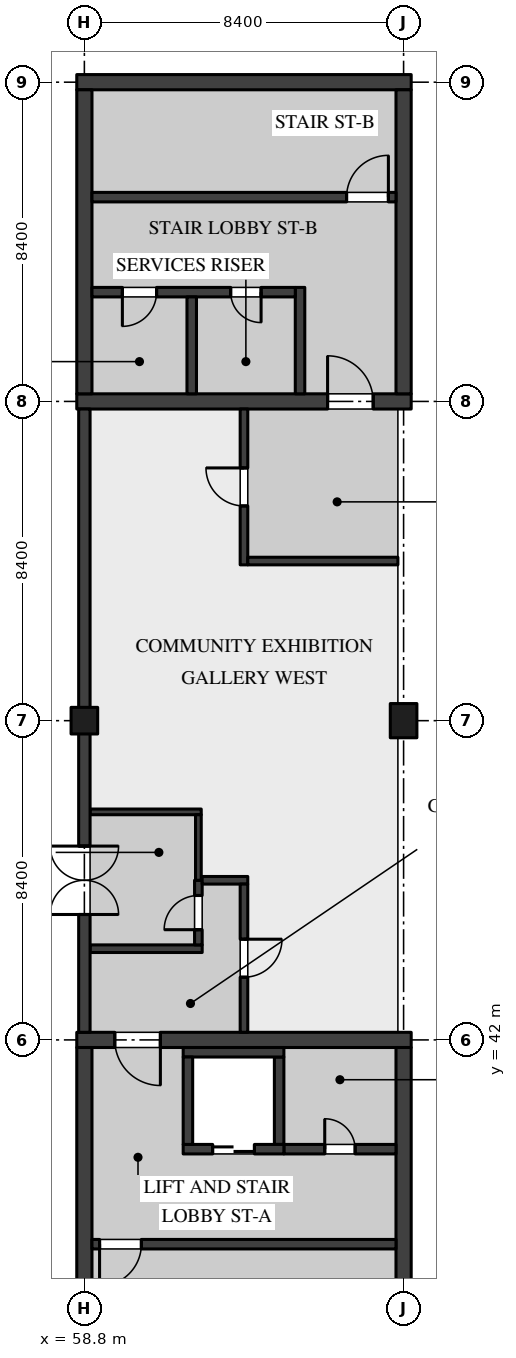
"""IFC4 building model, lengths in metres.
Left out: names, types, materials, properties, quantities, classifications, styles, units other than length and angle.
Written with IfcOpenShell. Run it as: python <this file> out.ifc"""

import sys

from ifc_helpers import new_model, si_unit, direction, frame, frame_2d, origin, origin_2d, place, context, subcontext, project, spatial, rectangle, extrude, element, fill, save


model = new_model("IFC4")
c1 = context("Model", 3, precision=1e-05, world=origin(), true_north=direction((0.0, 1.0)))
c2 = subcontext(c1, "Body", "Model", "MODEL_VIEW")
j1 = project(units=[si_unit("LENGTHUNIT", "METRE"), si_unit("PLANEANGLEUNIT", "RADIAN")], contexts=[c1])
p1 = place(None, origin())
s1 = spatial("IfcSite", under=j1, at=p1, CompositionType="ELEMENT")
p2 = place(p1, origin())
s2 = spatial("IfcBuilding", under=s1, at=p2, CompositionType="ELEMENT")
p3 = place(p2, frame((0.0, 0.0, 5.4)))
s3 = spatial("IfcBuildingStorey", under=s2, at=p3, CompositionType="ELEMENT", Elevation=5.4)
p4 = place(p3, frame((58.8, 50.4, 0.0), z_axis=(0.0, 0.0, 1.0), x_axis=(1.0, 0.0, 0.0)))
e1 = element("IfcColumn", 1, at=p4, inside=s3, PredefinedType="COLUMN", context=c2, shape_type="SweptSolid", body=[
    extrude(rectangle(XDim=0.7, YDim=0.7, at=origin_2d()), origin(), (0.0, 0.0, 1.0), 4.5),
])
p5 = place(p3, frame((67.2, 50.4, 0.0), z_axis=(0.0, 0.0, 1.0), x_axis=(1.0, 0.0, 0.0)))
e2 = element("IfcColumn", 2, at=p5, inside=s3, PredefinedType="COLUMN", context=c2, shape_type="SweptSolid", body=[
    extrude(rectangle(XDim=0.7, YDim=0.9, at=origin_2d()), origin(), (0.0, 0.0, 1.0), 4.5),
])
p6 = place(p3, frame((58.6, 42.0, 0.0), z_axis=(0.0, 0.0, 1.0), x_axis=(1.0, 0.0, 0.0)))
e3 = element("IfcWall", 3, at=p6, inside=s3, PredefinedType="SHEAR", context=c2, shape_type="SweptSolid", body=[
    extrude(rectangle(XDim=8.8, YDim=0.4, at=frame_2d((4.4, 0.0))), origin(), (0.0, 0.0, 1.0), 4.25),
])
p7 = place(p6, frame((1.0, 0.0, 0.0)))
e4 = element("IfcOpeningElement", 4, at=p7, cuts=e3, PredefinedType="OPENING", context=c2, shape_type="SweptSolid", body=[
    extrude(rectangle(XDim=1.2, YDim=2.1, at=frame_2d((0.6, 1.05))), frame((0.0, 0.21, 0.0), z_axis=(0.0, -1.0, 0.0), x_axis=(1.0, 0.0, 0.0)), (0.0, 0.0, 1.0), 0.42),
])
for number, where, z_axis, x_axis in (
    (5, (58.8, 33.8, 0.0), (0.0, 0.0, 1.0), (0.0, 1.0, 0.0)),
    (6, (67.2, 33.8, 0.0), (0.0, 0.0, 1.0), (0.0, 1.0, 0.0)),
):
    element("IfcWall", number, at=place(p3, frame(where, z_axis=z_axis, x_axis=x_axis)), inside=s3, PredefinedType="SHEAR", context=c2, shape_type="SweptSolid", body=[
        extrude(rectangle(XDim=8.0, YDim=0.4, at=frame_2d((4.0, 0.0))), origin(), (0.0, 0.0, 1.0), 4.25),
    ])
p8 = place(p3, frame((59.0, 36.625, 0.0), z_axis=(0.0, 0.0, 1.0), x_axis=(1.0, 0.0, 0.0)))
e7 = element("IfcWall", 7, at=p8, inside=s3, PredefinedType="SOLIDWALL", context=c2, shape_type="SweptSolid", body=[
    extrude(rectangle(XDim=8.0, YDim=0.25, at=frame_2d((4.0, 0.0))), origin(), (0.0, 0.0, 1.0), 4.25),
])
p9 = place(p8, frame((0.2, 0.0, 0.0)))
e8 = element("IfcOpeningElement", 8, at=p9, cuts=e7, PredefinedType="OPENING", context=c2, shape_type="SweptSolid", body=[
    extrude(rectangle(XDim=1.1, YDim=2.1, at=frame_2d((0.55, 1.05))), frame((0.0, 0.135, 0.0), z_axis=(0.0, -1.0, 0.0), x_axis=(1.0, 0.0, 0.0)), (0.0, 0.0, 1.0), 0.27),
])
p10 = place(p3, frame((64.05, 39.125, 0.0), z_axis=(0.0, 0.0, 1.0), x_axis=(1.0, 0.0, 0.0)))
e9 = element("IfcWall", 9, at=p10, inside=s3, PredefinedType="SOLIDWALL", context=c2, shape_type="SweptSolid", body=[
    extrude(rectangle(XDim=2.95, YDim=0.25, at=frame_2d((1.475, 0.0))), origin(), (0.0, 0.0, 1.0), 4.25),
])
p11 = place(p10, frame((1.075, 0.0, 0.0)))
e10 = element("IfcOpeningElement", 10, at=p11, cuts=e9, PredefinedType="OPENING", context=c2, shape_type="SweptSolid", body=[
    extrude(rectangle(XDim=0.8, YDim=2.1, at=frame_2d((0.4, 1.05))), frame((0.0, 0.135, 0.0), z_axis=(0.0, -1.0, 0.0), x_axis=(1.0, 0.0, 0.0)), (0.0, 0.0, 1.0), 0.27),
])
p12 = place(p3, frame((58.6, 58.8, 0.0), z_axis=(0.0, 0.0, 1.0), x_axis=(1.0, 0.0, 0.0)))
e11 = element("IfcWall", 11, at=p12, inside=s3, PredefinedType="SHEAR", context=c2, shape_type="SweptSolid", body=[
    extrude(rectangle(XDim=8.8, YDim=0.4, at=frame_2d((4.4, 0.0))), origin(), (0.0, 0.0, 1.0), 4.25),
])
p13 = place(p12, frame((6.6, 0.0, 0.0)))
e12 = element("IfcOpeningElement", 12, at=p13, cuts=e11, PredefinedType="OPENING", context=c2, shape_type="SweptSolid", body=[
    extrude(rectangle(XDim=1.2, YDim=2.1, at=frame_2d((0.6, 1.05))), frame((0.0, 0.21, 0.0), z_axis=(0.0, -1.0, 0.0), x_axis=(1.0, 0.0, 0.0)), (0.0, 0.0, 1.0), 0.42),
])
p14 = place(p3, frame((58.6, 67.2, 0.0), z_axis=(0.0, 0.0, 1.0), x_axis=(1.0, 0.0, 0.0)))
e13 = element("IfcWall", 13, at=p14, inside=s3, PredefinedType="SHEAR", context=c2, shape_type="SweptSolid", body=[
    extrude(rectangle(XDim=8.8, YDim=0.4, at=frame_2d((4.4, 0.0))), origin(), (0.0, 0.0, 1.0), 4.25),
])
for number, where, z_axis, x_axis in (
    (14, (58.8, 59.0, 0.0), (0.0, 0.0, 1.0), (0.0, 1.0, 0.0)),
    (15, (67.2, 59.0, 0.0), (0.0, 0.0, 1.0), (0.0, 1.0, 0.0)),
):
    element("IfcWall", number, at=place(p3, frame(where, z_axis=z_axis, x_axis=x_axis)), inside=s3, PredefinedType="SHEAR", context=c2, shape_type="SweptSolid", body=[
        extrude(rectangle(XDim=8.0, YDim=0.4, at=frame_2d((4.0, 0.0))), origin(), (0.0, 0.0, 1.0), 4.25),
    ])
p15 = place(p3, frame((67.0, 64.175, 0.0), z_axis=(0.0, 0.0, 1.0), x_axis=(-1.0, 0.0, 0.0)))
e16 = element("IfcWall", 16, at=p15, inside=s3, PredefinedType="SOLIDWALL", context=c2, shape_type="SweptSolid", body=[
    extrude(rectangle(XDim=8.0, YDim=0.25, at=frame_2d((4.0, 0.0))), origin(), (0.0, 0.0, 1.0), 4.25),
])
p16 = place(p15, frame((0.2, 0.0, 0.0)))
e17 = element("IfcOpeningElement", 17, at=p16, cuts=e16, PredefinedType="OPENING", context=c2, shape_type="SweptSolid", body=[
    extrude(rectangle(XDim=1.1, YDim=2.1, at=frame_2d((0.55, 1.05))), frame((0.0, 0.135, 0.0), z_axis=(0.0, -1.0, 0.0), x_axis=(1.0, 0.0, 0.0)), (0.0, 0.0, 1.0), 0.27),
])
p17 = place(p3, frame((64.475, 61.8, 0.0), z_axis=(0.0, 0.0, 1.0), x_axis=(0.0, -1.0, 0.0)))
e18 = element("IfcWall", 18, at=p17, inside=s3, PredefinedType="SOLIDWALL", context=c2, shape_type="SweptSolid", body=[
    extrude(rectangle(XDim=2.8, YDim=0.25, at=frame_2d((1.4, 0.0))), origin(), (0.0, 0.0, 1.0), 4.25),
])
p18 = place(p3, frame((64.35, 61.675, 0.0), z_axis=(0.0, 0.0, 1.0), x_axis=(-1.0, 0.0, 0.0)))
e19 = element("IfcWall", 19, at=p18, inside=s3, PredefinedType="SOLIDWALL", context=c2, shape_type="SweptSolid", body=[
    extrude(rectangle(XDim=5.35, YDim=0.25, at=frame_2d((2.675, 0.0))), origin(), (0.0, 0.0, 1.0), 4.25),
])
p19 = place(p18, frame((3.65, 0.0, 0.0)))
e20 = element("IfcOpeningElement", 20, at=p19, cuts=e19, PredefinedType="OPENING", context=c2, shape_type="SweptSolid", body=[
    extrude(rectangle(XDim=0.9, YDim=2.1, at=frame_2d((0.45, 1.05))), frame((0.0, 0.135, 0.0), z_axis=(0.0, -1.0, 0.0), x_axis=(1.0, 0.0, 0.0)), (0.0, 0.0, 1.0), 0.27),
])
p20 = place(p18, frame((0.9, 0.0, 0.0)))
e21 = element("IfcOpeningElement", 21, at=p20, cuts=e19, PredefinedType="OPENING", context=c2, shape_type="SweptSolid", body=[
    extrude(rectangle(XDim=0.8, YDim=2.1, at=frame_2d((0.4, 1.05))), frame((0.0, 0.135, 0.0), z_axis=(0.0, -1.0, 0.0), x_axis=(1.0, 0.0, 0.0)), (0.0, 0.0, 1.0), 0.27),
])
p21 = place(p3, frame((61.625, 61.55, 0.0), z_axis=(0.0, 0.0, 1.0), x_axis=(0.0, -1.0, 0.0)))
e22 = element("IfcWall", 22, at=p21, inside=s3, PredefinedType="SOLIDWALL", context=c2, shape_type="SweptSolid", body=[
    extrude(rectangle(XDim=2.55, YDim=0.25, at=frame_2d((1.275, 0.0))), origin(), (0.0, 0.0, 1.0), 4.25),
])
p22 = place(p3, frame((63.925, 39.25, 0.0), z_axis=(0.0, 0.0, 1.0), x_axis=(0.0, 1.0, 0.0)))
e23 = element("IfcWall", 23, at=p22, inside=s3, PredefinedType="SOLIDWALL", context=c2, shape_type="SweptSolid", body=[
    extrude(rectangle(XDim=2.3, YDim=0.25, at=frame_2d((1.15, 0.0))), origin(), (0.0, 0.0, 1.0), 4.25),
])
p23 = place(p3, frame((61.4, 41.675, 0.0), z_axis=(0.0, 0.0, 1.0), x_axis=(1.0, 0.0, 0.0)))
e24 = element("IfcWall", 24, at=p23, inside=s3, PredefinedType="SOLIDWALL", context=c2, shape_type="SweptSolid", body=[
    extrude(rectangle(XDim=2.65, YDim=0.25, at=frame_2d((1.325, 0.0))), origin(), (0.0, 0.0, 1.0), 4.25),
])
p24 = place(p3, frame((61.4, 39.125, 0.0), z_axis=(0.0, 0.0, 1.0), x_axis=(1.0, 0.0, 0.0)))
e25 = element("IfcWall", 25, at=p24, inside=s3, PredefinedType="SOLIDWALL", context=c2, shape_type="SweptSolid", body=[
    extrude(rectangle(XDim=2.65, YDim=0.25, at=frame_2d((1.325, 0.0))), origin(), (0.0, 0.0, 1.0), 4.25),
])
p25 = place(p24, frame((0.775, 0.0, 0.0)))
e26 = element("IfcOpeningElement", 26, at=p25, cuts=e25, PredefinedType="OPENING", context=c2, shape_type="SweptSolid", body=[
    extrude(rectangle(XDim=1.1, YDim=2.1, at=frame_2d((0.55, 1.05))), frame((0.0, 0.135, 0.0), z_axis=(0.0, -1.0, 0.0), x_axis=(1.0, 0.0, 0.0)), (0.0, 0.0, 1.0), 0.27),
])
p26 = place(p3, frame((61.525, 39.25, 0.0), z_axis=(0.0, 0.0, 1.0), x_axis=(0.0, 1.0, 0.0)))
e27 = element("IfcWall", 27, at=p26, inside=s3, PredefinedType="SOLIDWALL", context=c2, shape_type="SweptSolid", body=[
    extrude(rectangle(XDim=2.3, YDim=0.25, at=frame_2d((1.15, 0.0))), origin(), (0.0, 0.0, 1.0), 4.25),
])
p27 = place(p2, origin())
s4 = spatial("IfcBuildingStorey", under=s2, at=p27, CompositionType="ELEMENT", Elevation=0.0)
p28 = place(p27, frame((67.2, 46.2, 0.0), z_axis=(0.0, 0.0, 1.0), x_axis=(0.0, 1.0, 0.0)))
e28 = element("IfcWall", 28, at=p28, inside=s4, PredefinedType="PARTITIONING", context=c2, shape_type="SweptSolid", body=[
    extrude(rectangle(XDim=3.75, YDim=0.125, at=frame_2d((1.875, 0.0))), origin(), (0.0, 0.0, 1.0), 18.77),
])
p29 = place(p28, frame((1.35, 0.0, 0.0)))
e29 = element("IfcOpeningElement", 29, at=p29, cuts=e28, PredefinedType="OPENING", context=c2, shape_type="SweptSolid", body=[
    extrude(rectangle(XDim=1.0, YDim=2.4, at=frame_2d((0.5, 1.2))), frame((0.0, 0.073, 0.0), z_axis=(0.0, -1.0, 0.0), x_axis=(1.0, 0.0, 0.0)), (0.0, 0.0, 1.0), 0.145),
])
p30 = place(p27, frame((67.2, 50.85, 0.0), z_axis=(0.0, 0.0, 1.0), x_axis=(0.0, 1.0, 0.0)))
e30 = element("IfcWall", 30, at=p30, inside=s4, PredefinedType="PARTITIONING", context=c2, shape_type="SweptSolid", body=[
    extrude(rectangle(XDim=3.75, YDim=0.125, at=frame_2d((1.875, 0.0))), origin(), (0.0, 0.0, 1.0), 18.77),
])
p31 = place(p30, frame((1.35, 0.0, 0.0)))
e31 = element("IfcOpeningElement", 31, at=p31, cuts=e30, PredefinedType="OPENING", context=c2, shape_type="SweptSolid", body=[
    extrude(rectangle(XDim=1.0, YDim=2.4, at=frame_2d((0.5, 1.2))), frame((0.0, 0.073, 0.0), z_axis=(0.0, -1.0, 0.0), x_axis=(1.0, 0.0, 0.0)), (0.0, 0.0, 1.0), 0.145),
])
p32 = place(p27, frame((67.4, 63.0, 0.0), z_axis=(0.0, 0.0, 1.0), x_axis=(1.0, 0.0, 0.0)))
e32 = element("IfcWall", 32, at=p32, inside=s4, PredefinedType="PARTITIONING", context=c2, shape_type="SweptSolid", body=[
    extrude(rectangle(XDim=4.1, YDim=0.2, at=frame_2d((2.05, 0.0))), origin(), (0.0, 0.0, 1.0), 18.77),
])
p33 = place(p32, frame((1.55, 0.0, 0.0)))
e33 = element("IfcOpeningElement", 33, at=p33, cuts=e32, PredefinedType="OPENING", context=c2, shape_type="SweptSolid", body=[
    extrude(rectangle(XDim=1.0, YDim=2.1, at=frame_2d((0.5, 1.05))), frame((0.0, 0.11, 0.0), z_axis=(0.0, -1.0, 0.0), x_axis=(1.0, 0.0, 0.0)), (0.0, 0.0, 1.0), 0.22),
])
p34 = place(p27, frame((67.2, 54.6, 0.0), z_axis=(0.0, 0.0, 1.0), x_axis=(0.0, 1.0, 0.0)))
e34 = element("IfcWall", 34, at=p34, inside=s4, PredefinedType="PARTITIONING", context=c2, shape_type="SweptSolid", body=[
    extrude(rectangle(XDim=4.0, YDim=0.2, at=frame_2d((2.0, 0.0))), origin(), (0.0, 0.0, 1.0), 18.77),
])
p35 = place(p34, frame((1.5, 0.0, 0.0)))
e35 = element("IfcOpeningElement", 35, at=p35, cuts=e34, PredefinedType="OPENING", context=c2, shape_type="SweptSolid", body=[
    extrude(rectangle(XDim=1.0, YDim=2.4, at=frame_2d((0.5, 1.2))), frame((0.0, 0.11, 0.0), z_axis=(0.0, -1.0, 0.0), x_axis=(1.0, 0.0, 0.0)), (0.0, 0.0, 1.0), 0.22),
])
p36 = place(p27, frame((67.2, 42.2, 0.0), z_axis=(0.0, 0.0, 1.0), x_axis=(0.0, 1.0, 0.0)))
e36 = element("IfcWall", 36, at=p36, inside=s4, PredefinedType="PARTITIONING", context=c2, shape_type="SweptSolid", body=[
    extrude(rectangle(XDim=4.0, YDim=0.2, at=frame_2d((2.0, 0.0))), origin(), (0.0, 0.0, 1.0), 18.77),
])
p37 = place(p36, frame((1.5, 0.0, 0.0)))
e37 = element("IfcOpeningElement", 37, at=p37, cuts=e36, PredefinedType="OPENING", context=c2, shape_type="SweptSolid", body=[
    extrude(rectangle(XDim=1.0, YDim=2.4, at=frame_2d((0.5, 1.2))), frame((0.0, 0.11, 0.0), z_axis=(0.0, -1.0, 0.0), x_axis=(1.0, 0.0, 0.0)), (0.0, 0.0, 1.0), 0.22),
])
p38 = place(p3, frame((58.95, 44.4, 0.0), z_axis=(0.0, 0.0, 1.0), x_axis=(1.0, 0.0, 0.0)))
e38 = element("IfcWall", 38, at=p38, inside=s3, PredefinedType="PARTITIONING", context=c2, shape_type="SweptSolid", body=[
    extrude(rectangle(XDim=2.95, YDim=0.2, at=frame_2d((1.475, 0.0))), origin(), (0.0, 0.0, 1.0), 4.25),
])
p39 = place(p3, frame((61.8, 44.5, 0.0), z_axis=(0.0, 0.0, 1.0), x_axis=(0.0, 1.0, 0.0)))
e39 = element("IfcWall", 39, at=p39, inside=s3, PredefinedType="PARTITIONING", context=c2, shape_type="SweptSolid", body=[
    extrude(rectangle(XDim=1.7, YDim=0.2, at=frame_2d((0.85, 0.0))), origin(), (0.0, 0.0, 1.0), 4.25),
])
p40 = place(p39, frame((0.4, 0.0, 0.0)))
e40 = element("IfcOpeningElement", 40, at=p40, cuts=e39, PredefinedType="OPENING", context=c2, shape_type="SweptSolid", body=[
    extrude(rectangle(XDim=0.9, YDim=2.1, at=frame_2d((0.45, 1.05))), frame((0.0, 0.11, 0.0), z_axis=(0.0, -1.0, 0.0), x_axis=(1.0, 0.0, 0.0)), (0.0, 0.0, 1.0), 0.22),
])
p41 = place(p3, frame((58.95, 48.0, 0.0), z_axis=(0.0, 0.0, 1.0), x_axis=(1.0, 0.0, 0.0)))
e41 = element("IfcWall", 41, at=p41, inside=s3, PredefinedType="PARTITIONING", context=c2, shape_type="SweptSolid", body=[
    extrude(rectangle(XDim=2.925, YDim=0.15, at=frame_2d((1.462, 0.0))), origin(), (0.0, 0.0, 1.0), 4.25),
])
p42 = place(p3, frame((61.8, 46.2, 0.0), z_axis=(0.0, 0.0, 1.0), x_axis=(0.0, 1.0, 0.0)))
e42 = element("IfcWall", 42, at=p42, inside=s3, PredefinedType="PARTITIONING", context=c2, shape_type="SweptSolid", body=[
    extrude(rectangle(XDim=1.725, YDim=0.15, at=frame_2d((0.863, 0.0))), origin(), (0.0, 0.0, 1.0), 4.25),
])
p43 = place(p3, frame((63.0, 54.5, 0.0), z_axis=(0.0, 0.0, 1.0), x_axis=(0.0, 1.0, 0.0)))
e43 = element("IfcWall", 43, at=p43, inside=s3, PredefinedType="PARTITIONING", context=c2, shape_type="SweptSolid", body=[
    extrude(rectangle(XDim=4.1, YDim=0.2, at=frame_2d((2.05, 0.0))), origin(), (0.0, 0.0, 1.0), 4.25),
])
p44 = place(p43, frame((1.55, 0.0, 0.0)))
e44 = element("IfcOpeningElement", 44, at=p44, cuts=e43, PredefinedType="OPENING", context=c2, shape_type="SweptSolid", body=[
    extrude(rectangle(XDim=1.0, YDim=2.4, at=frame_2d((0.5, 1.2))), frame((0.0, 0.11, 0.0), z_axis=(0.0, -1.0, 0.0), x_axis=(1.0, 0.0, 0.0)), (0.0, 0.0, 1.0), 0.22),
])
p45 = place(p3, frame((63.1, 54.6, 0.0), z_axis=(0.0, 0.0, 1.0), x_axis=(1.0, 0.0, 0.0)))
e45 = element("IfcWall", 45, at=p45, inside=s3, PredefinedType="PARTITIONING", context=c2, shape_type="SweptSolid", body=[
    extrude(rectangle(XDim=3.95, YDim=0.2, at=frame_2d((1.975, 0.0))), origin(), (0.0, 0.0, 1.0), 4.25),
])
p46 = place(p3, frame((61.9, 46.2, 0.0), z_axis=(0.0, 0.0, 1.0), x_axis=(1.0, 0.0, 0.0)))
e46 = element("IfcWall", 46, at=p46, inside=s3, PredefinedType="PARTITIONING", context=c2, shape_type="SweptSolid", body=[
    extrude(rectangle(XDim=1.2, YDim=0.2, at=frame_2d((0.6, 0.0))), origin(), (0.0, 0.0, 1.0), 4.25),
])
p47 = place(p3, frame((63.0, 42.2, 0.0), z_axis=(0.0, 0.0, 1.0), x_axis=(0.0, 1.0, 0.0)))
e47 = element("IfcWall", 47, at=p47, inside=s3, PredefinedType="PARTITIONING", context=c2, shape_type="SweptSolid", body=[
    extrude(rectangle(XDim=3.9, YDim=0.2, at=frame_2d((1.95, 0.0))), origin(), (0.0, 0.0, 1.0), 4.25),
])
p48 = place(p47, frame((1.45, 0.0, 0.0)))
e48 = element("IfcOpeningElement", 48, at=p48, cuts=e47, PredefinedType="OPENING", context=c2, shape_type="SweptSolid", body=[
    extrude(rectangle(XDim=1.0, YDim=2.4, at=frame_2d((0.5, 1.2))), frame((0.0, 0.11, 0.0), z_axis=(0.0, -1.0, 0.0), x_axis=(1.0, 0.0, 0.0)), (0.0, 0.0, 1.0), 0.22),
])
p49 = place(p3, frame((58.8, 58.6, 0.0), z_axis=(0.0, 0.0, 1.0), x_axis=(0.0, -1.0, 0.0)))
e49 = element("IfcWall", 49, at=p49, inside=s3, PredefinedType="SOLIDWALL", context=c2, shape_type="SweptSolid", body=[
    extrude(rectangle(XDim=7.87, YDim=0.3, at=frame_2d((3.935, 0.0))), origin(), (0.0, 0.0, 1.0), 4.5),
])
p50 = place(p3, frame((58.8, 50.07, 0.0), z_axis=(0.0, 0.0, 1.0), x_axis=(0.0, -1.0, 0.0)))
e50 = element("IfcWall", 50, at=p50, inside=s3, PredefinedType="SOLIDWALL", context=c2, shape_type="SweptSolid", body=[
    extrude(rectangle(XDim=7.87, YDim=0.3, at=frame_2d((3.935, 0.0))), origin(), (0.0, 0.0, 1.0), 4.5),
])
p51 = place(p50, frame((2.97, 0.0, 0.0)))
e51 = element("IfcOpeningElement", 51, at=p51, cuts=e50, PredefinedType="OPENING", context=c2, shape_type="SweptSolid", body=[
    extrude(rectangle(XDim=1.8, YDim=2.4, at=frame_2d((0.9, 1.2))), frame((0.0, 0.16, 0.0), z_axis=(0.0, -1.0, 0.0), x_axis=(1.0, 0.0, 0.0)), (0.0, 0.0, 1.0), 0.32),
])
p52 = place(p7, frame((1.2, 0.0, 0.0), z_axis=(0.0, 0.0, 1.0), x_axis=(-1.0, 0.0, 0.0)))
e52 = element("IfcDoor", 52, at=p52, inside=s3, OperationType="SINGLE_SWING_RIGHT", PredefinedType="DOOR", context=c2, shape_type="SweptSolid", body=[
    extrude(rectangle(XDim=1.2, YDim=2.1, at=frame_2d((0.6, 1.05))), frame((0.0, 0.035, 0.0), z_axis=(0.0, -1.0, 0.0), x_axis=(1.0, 0.0, 0.0)), (0.0, 0.0, 1.0), 0.07),
])
fill(e4, e52)
p53 = place(p11, origin())
e53 = element("IfcDoor", 53, at=p53, inside=s3, OperationType="SINGLE_SWING_RIGHT", PredefinedType="DOOR", context=c2, shape_type="SweptSolid", body=[
    extrude(rectangle(XDim=0.8, YDim=2.1, at=frame_2d((0.4, 1.05))), frame((0.0, 0.035, 0.0), z_axis=(0.0, -1.0, 0.0), x_axis=(1.0, 0.0, 0.0)), (0.0, 0.0, 1.0), 0.07),
])
fill(e10, e53)
p54 = place(p9, frame((1.1, 0.0, 0.0), z_axis=(0.0, 0.0, 1.0), x_axis=(-1.0, 0.0, 0.0)))
e54 = element("IfcDoor", 54, at=p54, inside=s3, OperationType="SINGLE_SWING_LEFT", PredefinedType="DOOR", context=c2, shape_type="SweptSolid", body=[
    extrude(rectangle(XDim=1.1, YDim=2.1, at=frame_2d((0.55, 1.05))), frame((0.0, 0.035, 0.0), z_axis=(0.0, -1.0, 0.0), x_axis=(1.0, 0.0, 0.0)), (0.0, 0.0, 1.0), 0.07),
])
fill(e8, e54)
p55 = place(p19, origin())
e55 = element("IfcDoor", 55, at=p55, inside=s3, OperationType="SINGLE_SWING_LEFT", PredefinedType="DOOR", context=c2, shape_type="SweptSolid", body=[
    extrude(rectangle(XDim=0.9, YDim=2.1, at=frame_2d((0.45, 1.05))), frame((0.0, 0.035, 0.0), z_axis=(0.0, -1.0, 0.0), x_axis=(1.0, 0.0, 0.0)), (0.0, 0.0, 1.0), 0.07),
])
fill(e20, e55)
p56 = place(p13, origin())
e56 = element("IfcDoor", 56, at=p56, inside=s3, OperationType="SINGLE_SWING_RIGHT", PredefinedType="DOOR", context=c2, shape_type="SweptSolid", body=[
    extrude(rectangle(XDim=1.2, YDim=2.1, at=frame_2d((0.6, 1.05))), frame((0.0, 0.035, 0.0), z_axis=(0.0, -1.0, 0.0), x_axis=(1.0, 0.0, 0.0)), (0.0, 0.0, 1.0), 0.07),
])
fill(e12, e56)
p57 = place(p20, origin())
e57 = element("IfcDoor", 57, at=p57, inside=s3, OperationType="SINGLE_SWING_RIGHT", PredefinedType="DOOR", context=c2, shape_type="SweptSolid", body=[
    extrude(rectangle(XDim=0.8, YDim=2.1, at=frame_2d((0.4, 1.05))), frame((0.0, 0.035, 0.0), z_axis=(0.0, -1.0, 0.0), x_axis=(1.0, 0.0, 0.0)), (0.0, 0.0, 1.0), 0.07),
])
fill(e21, e57)
p58 = place(p16, frame((1.1, 0.0, 0.0), z_axis=(0.0, 0.0, 1.0), x_axis=(-1.0, 0.0, 0.0)))
e58 = element("IfcDoor", 58, at=p58, inside=s3, OperationType="SINGLE_SWING_LEFT", PredefinedType="DOOR", context=c2, shape_type="SweptSolid", body=[
    extrude(rectangle(XDim=1.1, YDim=2.1, at=frame_2d((0.55, 1.05))), frame((0.0, 0.035, 0.0), z_axis=(0.0, -1.0, 0.0), x_axis=(1.0, 0.0, 0.0)), (0.0, 0.0, 1.0), 0.07),
])
fill(e17, e58)
p59 = place(p25, origin())
e59 = element("IfcDoor", 59, at=p59, inside=s3, OperationType="DOUBLE_DOOR_SLIDING", PredefinedType="DOOR", context=c2, shape_type="SweptSolid", body=[
    extrude(rectangle(XDim=1.1, YDim=2.1, at=frame_2d((0.55, 1.05))), frame((0.0, 0.04, 0.0), z_axis=(0.0, -1.0, 0.0), x_axis=(1.0, 0.0, 0.0)), (0.0, 0.0, 1.0), 0.08),
])
fill(e26, e59)
p60 = place(p40, origin())
e60 = element("IfcDoor", 60, at=p60, inside=s3, OperationType="SINGLE_SWING_RIGHT", PredefinedType="DOOR", context=c2, shape_type="SweptSolid", body=[
    extrude(rectangle(XDim=0.9, YDim=2.1, at=frame_2d((0.45, 1.05))), frame((0.0, 0.03, 0.0), z_axis=(0.0, -1.0, 0.0), x_axis=(1.0, 0.0, 0.0)), (0.0, 0.0, 1.0), 0.06),
])
fill(e40, e60)
p61 = place(p44, origin())
e61 = element("IfcDoor", 61, at=p61, inside=s3, OperationType="SINGLE_SWING_LEFT", PredefinedType="DOOR", context=c2, shape_type="SweptSolid", body=[
    extrude(rectangle(XDim=1.0, YDim=2.4, at=frame_2d((0.5, 1.2))), frame((0.0, 0.035, 0.0), z_axis=(0.0, -1.0, 0.0), x_axis=(1.0, 0.0, 0.0)), (0.0, 0.0, 1.0), 0.07),
])
fill(e44, e61)
p62 = place(p48, frame((1.0, 0.0, 0.0), z_axis=(0.0, 0.0, 1.0), x_axis=(-1.0, 0.0, 0.0)))
e62 = element("IfcDoor", 62, at=p62, inside=s3, OperationType="SINGLE_SWING_RIGHT", PredefinedType="DOOR", context=c2, shape_type="SweptSolid", body=[
    extrude(rectangle(XDim=1.0, YDim=2.4, at=frame_2d((0.5, 1.2))), frame((0.0, 0.035, 0.0), z_axis=(0.0, -1.0, 0.0), x_axis=(1.0, 0.0, 0.0)), (0.0, 0.0, 1.0), 0.07),
])
fill(e48, e62)
p63 = place(p51, frame((1.8, 0.0, 0.0), z_axis=(0.0, 0.0, 1.0), x_axis=(-1.0, 0.0, 0.0)))
e63 = element("IfcDoor", 63, at=p63, inside=s3, OperationType="DOUBLE_DOOR_DOUBLE_SWING", PredefinedType="DOOR", context=c2, shape_type="SweptSolid", body=[
    extrude(rectangle(XDim=1.8, YDim=2.4, at=frame_2d((0.9, 1.2))), frame((0.0, 0.025, 0.0), z_axis=(0.0, -1.0, 0.0), x_axis=(1.0, 0.0, 0.0)), (0.0, 0.0, 1.0), 0.05),
])
fill(e51, e63)
save(model, sys.argv[1])
